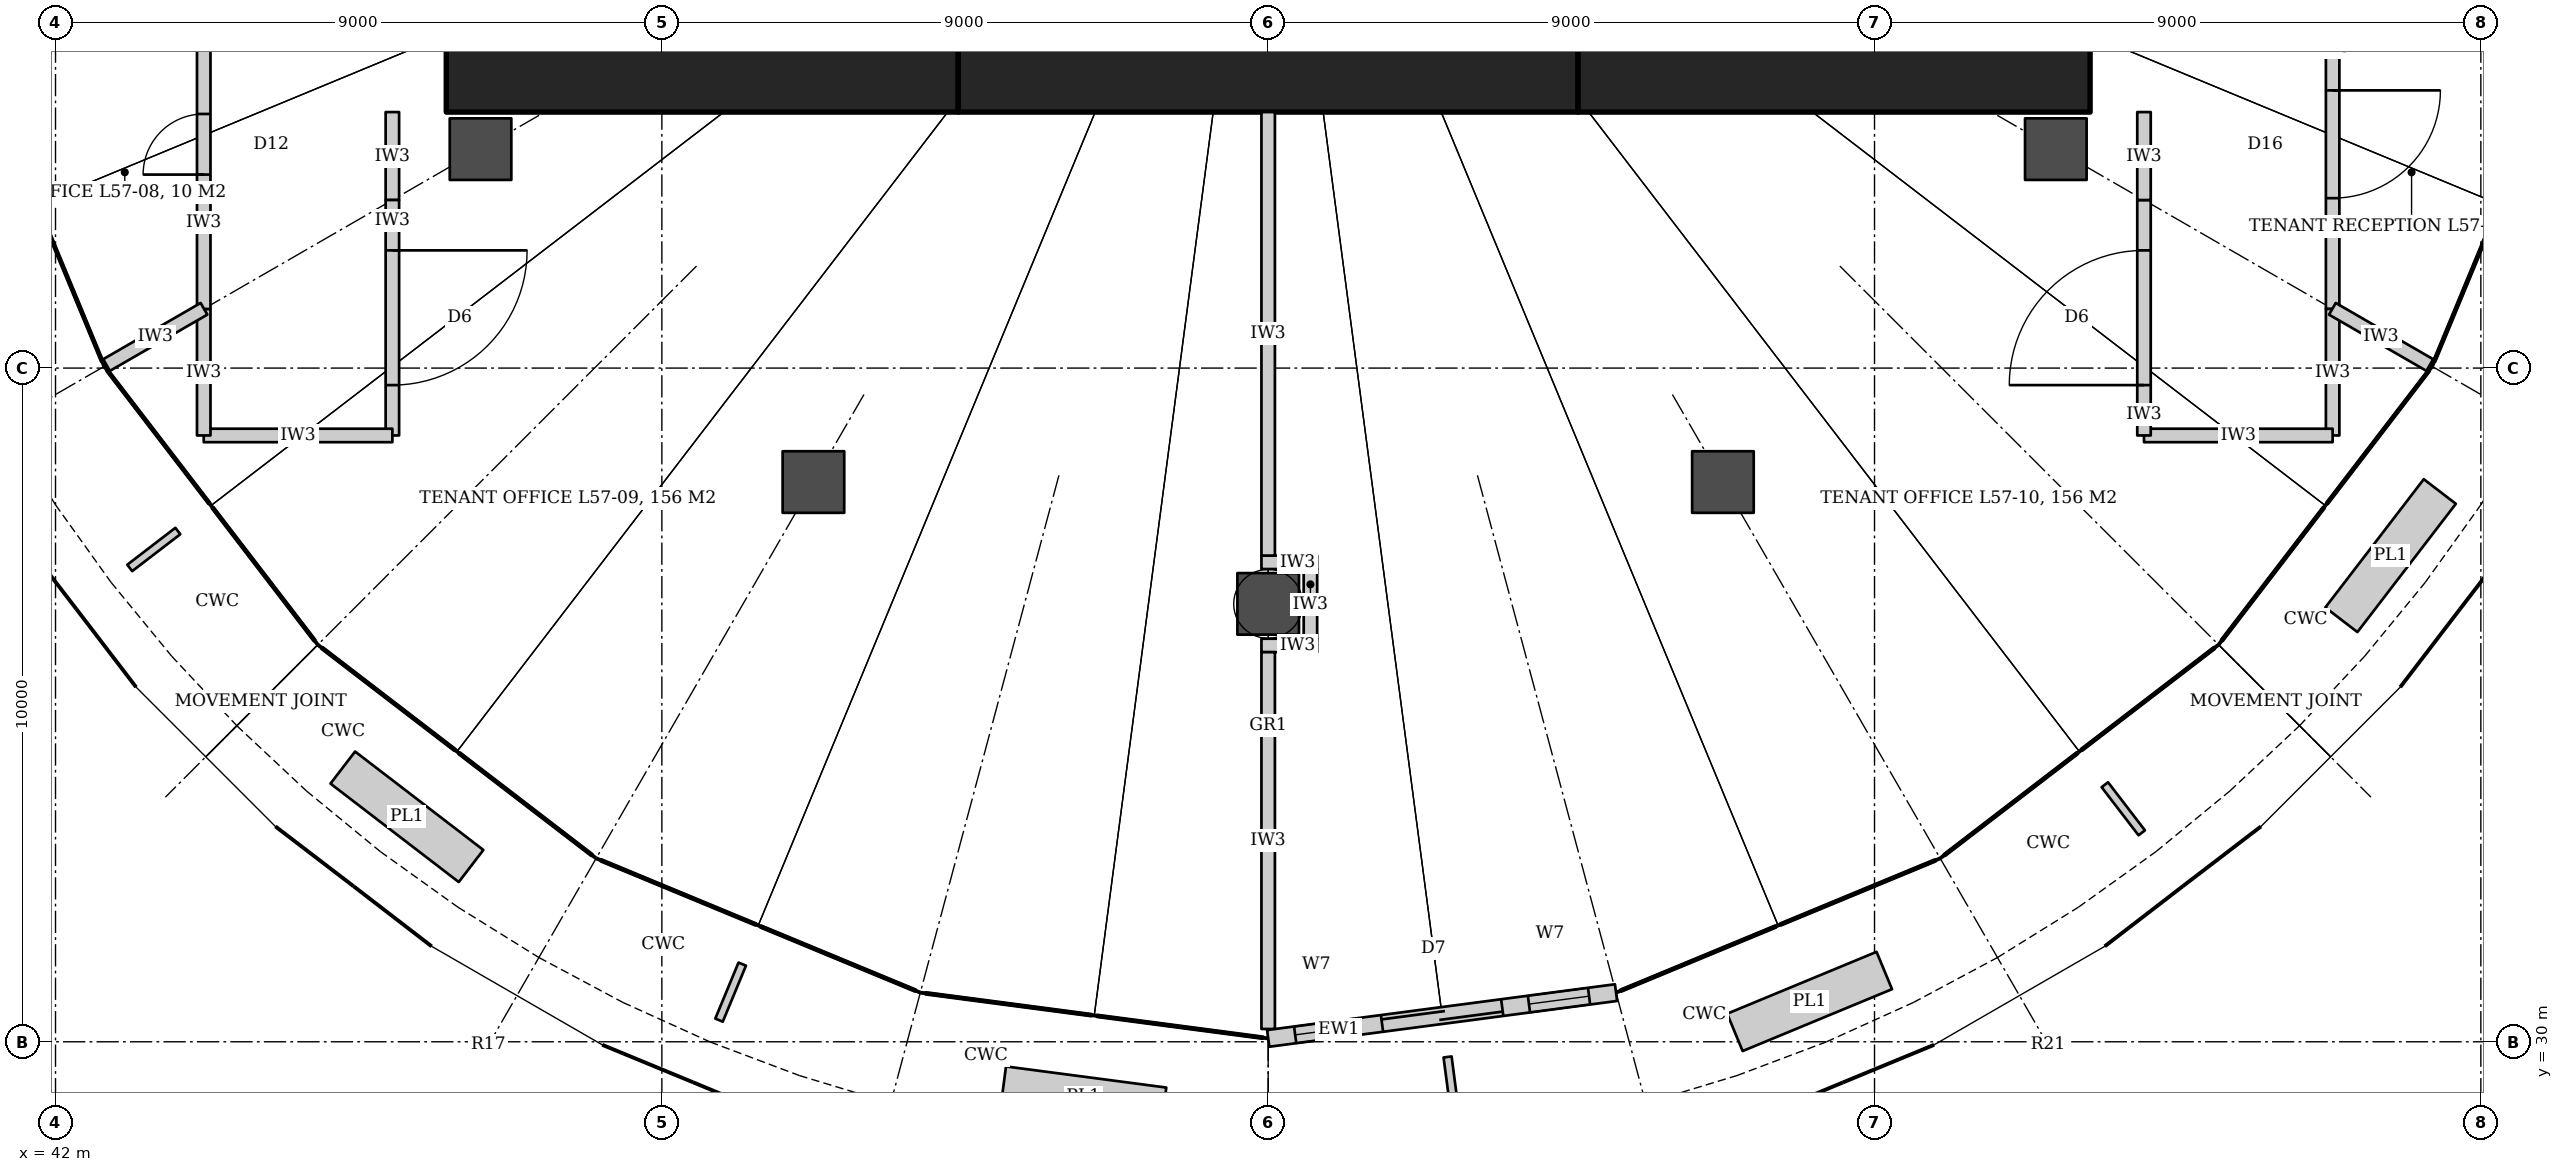
"""IFC4 building model, lengths in metres.
Left out: names, types, materials, properties, quantities, classifications, styles, units other than length and angle.
Written with IfcOpenShell. Run it as: python <this file> out.ifc"""

import sys

from ifc_helpers import new_model, si_unit, direction, frame, frame_2d, origin, origin_2d, place, context, subcontext, project, spatial, rectangle, hollow_circle, extrude, element, fill, save


model = new_model("IFC4")
c1 = context("Model", 3, precision=1e-05, world=origin(), true_north=direction((0.0, 1.0)))
c2 = subcontext(c1, "Body", "Model", "MODEL_VIEW")
j1 = project(units=[si_unit("LENGTHUNIT", "METRE"), si_unit("PLANEANGLEUNIT", "RADIAN")], contexts=[c1])
p1 = place(None, origin())
s1 = spatial("IfcSite", under=j1, at=p1, CompositionType="ELEMENT")
p2 = place(p1, origin())
s2 = spatial("IfcBuilding", under=s1, at=p2, CompositionType="ELEMENT")
p3 = place(p2, frame((0.0, 0.0, 240.2)))
s3 = spatial("IfcBuildingStorey", under=s2, at=p3, CompositionType="ELEMENT", Elevation=240.2)
p4 = place(p3, frame((47.8, 44.55, 0.0), z_axis=(0.0, 0.0, 1.0), x_axis=(1.0, 0.0, 0.0)))
e1 = element("IfcWall", 1, at=p4, inside=s3, PredefinedType="SHEAR", context=c2, shape_type="SweptSolid", body=[
    extrude(rectangle(XDim=7.6, YDim=1.5, at=frame_2d((3.8, 0.0))), origin(), (0.0, 0.0, 1.0), 4.2),
])
p5 = place(p3, frame((55.4, 44.55, 0.0), z_axis=(0.0, 0.0, 1.0), x_axis=(1.0, 0.0, 0.0)))
e2 = element("IfcWall", 2, at=p5, inside=s3, PredefinedType="SHEAR", context=c2, shape_type="SweptSolid", body=[
    extrude(rectangle(XDim=9.2, YDim=1.5, at=frame_2d((4.6, 0.0))), origin(), (0.0, 0.0, 1.0), 4.2),
])
p6 = place(p3, frame((64.6, 44.55, 0.0), z_axis=(0.0, 0.0, 1.0), x_axis=(1.0, 0.0, 0.0)))
e3 = element("IfcWall", 3, at=p6, inside=s3, PredefinedType="SHEAR", context=c2, shape_type="SweptSolid", body=[
    extrude(rectangle(XDim=7.6, YDim=1.5, at=frame_2d((3.8, 0.0))), origin(), (0.0, 0.0, 1.0), 4.2),
])
for number, where, z_axis, x_axis in (
    (4, (48.309, 43.25, 0.0), (0.0, 0.0, 1.0), (1.0, 0.0, 0.0)),
    (5, (53.25, 38.309, 0.0), (0.0, 0.0, 1.0), (1.0, 0.0, 0.0)),
    (6, (60.0, 36.5, 0.0), (0.0, 0.0, 1.0), (1.0, 0.0, 0.0)),
    (7, (66.75, 38.309, 0.0), (0.0, 0.0, 1.0), (1.0, 0.0, 0.0)),
    (8, (71.691, 43.25, 0.0), (0.0, 0.0, 1.0), (1.0, 0.0, 0.0)),
):
    element("IfcColumn", number, at=place(p3, frame(where, z_axis=z_axis, x_axis=x_axis)), inside=s3, PredefinedType="COLUMN", context=c2, shape_type="SweptSolid", body=[
        extrude(hollow_circle(Radius=0.457, WallThickness=0.045, at=origin_2d()), origin(), (0.0, 0.0, 1.0), 4.2),
    ])
p7 = place(p3, frame((75.8, 45.766, 0.0), z_axis=(0.0, 0.0, 1.0), x_axis=(0.0, -1.0, 0.0)))
e9 = element("IfcWall", 9, at=p7, inside=s3, PredefinedType="PARTITIONING", context=c2, shape_type="SweptSolid", body=[
    extrude(rectangle(XDim=4.888, YDim=0.2, at=frame_2d((2.444, 0.0))), origin(), (0.0, 0.0, 1.0), 3.02),
])
p8 = place(p7, frame((1.644, 0.0, 0.0)))
e10 = element("IfcOpeningElement", 10, at=p8, cuts=e9, PredefinedType="OPENING", context=c2, shape_type="SweptSolid", body=[
    extrude(rectangle(XDim=1.6, YDim=2.4, at=frame_2d((0.8, 1.2))), frame((0.0, 0.11, 0.0), z_axis=(0.0, -1.0, 0.0), x_axis=(1.0, 0.0, 0.0)), (0.0, 0.0, 1.0), 0.22),
])
p9 = place(p3, frame((75.8, 40.878, 0.0), z_axis=(0.0, 0.0, 1.0), x_axis=(0.0, -1.0, 0.0)))
e11 = element("IfcWall", 11, at=p9, inside=s3, PredefinedType="PARTITIONING", context=c2, shape_type="SweptSolid", body=[
    extrude(rectangle(XDim=1.878, YDim=0.2, at=frame_2d((0.939, 0.0))), origin(), (0.0, 0.0, 1.0), 3.02),
])
p10 = place(p3, frame((75.8, 39.0, 0.0), z_axis=(0.0, 0.0, 1.0), x_axis=(-1.0, 0.0, 0.0)))
e12 = element("IfcWall", 12, at=p10, inside=s3, PredefinedType="PARTITIONING", context=c2, shape_type="SweptSolid", body=[
    extrude(rectangle(XDim=2.8, YDim=0.2, at=frame_2d((1.4, 0.0))), origin(), (0.0, 0.0, 1.0), 3.04),
])
p11 = place(p3, frame((73.0, 39.0, 0.0), z_axis=(0.0, 0.0, 1.0), x_axis=(0.0, 1.0, 0.0)))
e13 = element("IfcWall", 13, at=p11, inside=s3, PredefinedType="PARTITIONING", context=c2, shape_type="SweptSolid", body=[
    extrude(rectangle(XDim=3.494, YDim=0.2, at=frame_2d((1.747, 0.0))), origin(), (0.0, 0.0, 1.0), 3.02),
])
p12 = place(p11, frame((0.747, 0.0, 0.0)))
e14 = element("IfcOpeningElement", 14, at=p12, cuts=e13, PredefinedType="OPENING", context=c2, shape_type="SweptSolid", body=[
    extrude(rectangle(XDim=2.0, YDim=2.1, at=frame_2d((1.0, 1.05))), frame((0.0, 0.11, 0.0), z_axis=(0.0, -1.0, 0.0), x_axis=(1.0, 0.0, 0.0)), (0.0, 0.0, 1.0), 0.22),
])
for number, where, z_axis, x_axis in (
    (15, (73.0, 42.494, 0.0), (0.0, 0.0, 1.0), (0.0, 1.0, 0.0)),
    (16, (47.0, 43.8, 0.0), (0.0, 0.0, 1.0), (0.0, -1.0, 0.0)),
):
    element("IfcWall", number, at=place(p3, frame(where, z_axis=z_axis, x_axis=x_axis)), inside=s3, PredefinedType="PARTITIONING", context=c2, shape_type="SweptSolid", body=[
        extrude(rectangle(XDim=1.306, YDim=0.2, at=frame_2d((0.653, 0.0))), origin(), (0.0, 0.0, 1.0), 3.02),
    ])
p13 = place(p3, frame((47.0, 42.494, 0.0), z_axis=(0.0, 0.0, 1.0), x_axis=(0.0, -1.0, 0.0)))
e17 = element("IfcWall", 17, at=p13, inside=s3, PredefinedType="PARTITIONING", context=c2, shape_type="SweptSolid", body=[
    extrude(rectangle(XDim=3.494, YDim=0.2, at=frame_2d((1.747, 0.0))), origin(), (0.0, 0.0, 1.0), 3.02),
])
p14 = place(p13, frame((0.747, 0.0, 0.0)))
e18 = element("IfcOpeningElement", 18, at=p14, cuts=e17, PredefinedType="OPENING", context=c2, shape_type="SweptSolid", body=[
    extrude(rectangle(XDim=2.0, YDim=2.1, at=frame_2d((1.0, 1.05))), frame((0.0, 0.11, 0.0), z_axis=(0.0, -1.0, 0.0), x_axis=(1.0, 0.0, 0.0)), (0.0, 0.0, 1.0), 0.22),
])
p15 = place(p3, frame((47.0, 39.0, 0.0), z_axis=(0.0, 0.0, 1.0), x_axis=(-1.0, 0.0, 0.0)))
e19 = element("IfcWall", 19, at=p15, inside=s3, PredefinedType="PARTITIONING", context=c2, shape_type="SweptSolid", body=[
    extrude(rectangle(XDim=2.8, YDim=0.2, at=frame_2d((1.4, 0.0))), origin(), (0.0, 0.0, 1.0), 3.04),
])
p16 = place(p3, frame((44.2, 39.0, 0.0), z_axis=(0.0, 0.0, 1.0), x_axis=(0.0, 1.0, 0.0)))
e20 = element("IfcWall", 20, at=p16, inside=s3, PredefinedType="PARTITIONING", context=c2, shape_type="SweptSolid", body=[
    extrude(rectangle(XDim=1.878, YDim=0.2, at=frame_2d((0.939, 0.0))), origin(), (0.0, 0.0, 1.0), 3.02),
])
p17 = place(p3, frame((44.2, 40.878, 0.0), z_axis=(0.0, 0.0, 1.0), x_axis=(0.0, 1.0, 0.0)))
e21 = element("IfcWall", 21, at=p17, inside=s3, PredefinedType="PARTITIONING", context=c2, shape_type="SweptSolid", body=[
    extrude(rectangle(XDim=4.888, YDim=0.2, at=frame_2d((2.444, 0.0))), origin(), (0.0, 0.0, 1.0), 3.02),
])
p18 = place(p17, frame((1.994, 0.0, 0.0)))
e22 = element("IfcOpeningElement", 22, at=p18, cuts=e21, PredefinedType="OPENING", context=c2, shape_type="SweptSolid", body=[
    extrude(rectangle(XDim=0.9, YDim=2.4, at=frame_2d((0.45, 1.2))), frame((0.0, 0.11, 0.0), z_axis=(0.0, -1.0, 0.0), x_axis=(1.0, 0.0, 0.0)), (0.0, 0.0, 1.0), 0.22),
])
p19 = place(p3, frame((44.204, 40.88, 0.0), z_axis=(0.0, 0.0, 1.0), x_axis=(-0.866073756611, -0.499916241094, 0.0)))
e23 = element("IfcWall", 23, at=p19, inside=s3, PredefinedType="PARTITIONING", context=c2, shape_type="SweptSolid", body=[
    extrude(rectangle(XDim=1.745, YDim=0.2, at=frame_2d((0.873, 0.0))), origin(), (0.0, 0.0, 1.0), 3.02),
])
for number, where, z_axis, x_axis in (
    (24, (59.9, 37.117, 0.0), (0.0, 0.0, 1.0), (1.0, 0.0, 0.0)),
    (25, (59.9, 35.883, 0.0), (0.0, 0.0, 1.0), (1.0, 0.0, 0.0)),
):
    element("IfcWall", number, at=place(p3, frame(where, z_axis=z_axis, x_axis=x_axis)), inside=s3, PredefinedType="PARTITIONING", context=c2, shape_type="SweptSolid", body=[
        extrude(rectangle(XDim=0.827, YDim=0.2, at=frame_2d((0.414, 0.0))), origin(), (0.0, 0.0, 1.0), 3.02),
    ])
p20 = place(p3, frame((60.627, 37.017, 0.0), z_axis=(0.0, 0.0, 1.0), x_axis=(0.0, -1.0, 0.0)))
e26 = element("IfcWall", 26, at=p20, inside=s3, PredefinedType="PARTITIONING", context=c2, shape_type="SweptSolid", body=[
    extrude(rectangle(XDim=1.034, YDim=0.2, at=frame_2d((0.517, 0.0))), origin(), (0.0, 0.0, 1.0), 3.02),
])
p21 = place(p3, frame((60.0, 43.8, 0.0), z_axis=(0.0, 0.0, 1.0), x_axis=(0.0, -1.0, 0.0)))
e27 = element("IfcWall", 27, at=p21, inside=s3, PredefinedType="PARTITIONING", context=c2, shape_type="SweptSolid", body=[
    extrude(rectangle(XDim=6.583, YDim=0.2, at=frame_2d((3.292, 0.0))), origin(), (0.0, 0.0, 1.0), 3.04),
])
p22 = place(p3, frame((60.0, 35.783, 0.0), z_axis=(0.0, 0.0, 1.0), x_axis=(0.0, -1.0, 0.0)))
e28 = element("IfcWall", 28, at=p22, inside=s3, PredefinedType="PARTITIONING", context=c2, shape_type="SweptSolid", body=[
    extrude(rectangle(XDim=5.668, YDim=0.2, at=frame_2d((2.834, 0.0))), origin(), (0.0, 0.0, 1.0), 3.02),
])
p23 = place(p3, frame((75.796, 40.88, 0.0), z_axis=(0.0, 0.0, 1.0), x_axis=(0.866073756611, -0.499916241094, 0.0)))
e29 = element("IfcWall", 29, at=p23, inside=s3, PredefinedType="PARTITIONING", context=c2, shape_type="SweptSolid", body=[
    extrude(rectangle(XDim=1.745, YDim=0.2, at=frame_2d((0.873, 0.0))), origin(), (0.0, 0.0, 1.0), 3.02),
])
p24 = place(p3, frame((60.0, 29.975, 0.0), z_axis=(0.0, 0.0, 1.0), x_axis=(0.99145000307, 0.130487131216, 0.0)))
e30 = element("IfcWall", 30, at=p24, inside=s3, PredefinedType="SOLIDWALL", context=c2, shape_type="SweptSolid", body=[
    extrude(rectangle(XDim=5.228, YDim=0.25, at=frame_2d((2.614, 0.0))), origin(), (0.0, 0.0, 1.0), 4.04),
])
p25 = place(p24, frame((1.714, 0.0, 0.0)))
e31 = element("IfcOpeningElement", 31, at=p25, cuts=e30, PredefinedType="OPENING", context=c2, shape_type="SweptSolid", body=[
    extrude(rectangle(XDim=1.8, YDim=2.4, at=frame_2d((0.9, 1.2))), frame((0.0, 0.135, 0.0), z_axis=(0.0, -1.0, 0.0), x_axis=(1.0, 0.0, 0.0)), (0.0, 0.0, 1.0), 0.27),
])
p26 = place(p24, frame((0.414, 0.0, 0.0)))
e32 = element("IfcOpeningElement", 32, at=p26, cuts=e30, PredefinedType="OPENING", context=c2, shape_type="SweptSolid", body=[
    extrude(rectangle(XDim=0.9, YDim=2.4, at=frame_2d((0.45, 1.2))), frame((0.0, 0.135, 0.0), z_axis=(0.0, -1.0, 0.0), x_axis=(1.0, 0.0, 0.0)), (0.0, 0.0, 1.0), 0.27),
])
p27 = place(p24, frame((3.914, 0.0, 0.0)))
e33 = element("IfcOpeningElement", 33, at=p27, cuts=e30, PredefinedType="OPENING", context=c2, shape_type="SweptSolid", body=[
    extrude(rectangle(XDim=0.9, YDim=2.4, at=frame_2d((0.45, 1.2))), frame((0.0, 0.135, 0.0), z_axis=(0.0, -1.0, 0.0), x_axis=(1.0, 0.0, 0.0)), (0.0, 0.0, 1.0), 0.27),
])
p28 = place(p18, origin())
e34 = element("IfcDoor", 34, at=p28, inside=s3, OperationType="SINGLE_SWING_LEFT", PredefinedType="DOOR", context=c2, shape_type="SweptSolid", body=[
    extrude(rectangle(XDim=0.9, YDim=2.4, at=frame_2d((0.45, 1.2))), frame((0.0, 0.025, 0.0), z_axis=(0.0, -1.0, 0.0), x_axis=(1.0, 0.0, 0.0)), (0.0, 0.0, 1.0), 0.05),
])
fill(e22, e34)
p29 = place(p14, origin())
e35 = element("IfcDoor", 35, at=p29, inside=s3, OperationType="DOUBLE_DOOR_DOUBLE_SWING", PredefinedType="DOOR", context=c2, shape_type="SweptSolid", body=[
    extrude(rectangle(XDim=2.0, YDim=2.1, at=frame_2d((1.0, 1.05))), frame((0.0, 0.025, 0.0), z_axis=(0.0, -1.0, 0.0), x_axis=(1.0, 0.0, 0.0)), (0.0, 0.0, 1.0), 0.05),
])
fill(e18, e35)
p30 = place(p12, origin())
e36 = element("IfcDoor", 36, at=p30, inside=s3, OperationType="DOUBLE_DOOR_DOUBLE_SWING", PredefinedType="DOOR", context=c2, shape_type="SweptSolid", body=[
    extrude(rectangle(XDim=2.0, YDim=2.1, at=frame_2d((1.0, 1.05))), frame((0.0, 0.025, 0.0), z_axis=(0.0, -1.0, 0.0), x_axis=(1.0, 0.0, 0.0)), (0.0, 0.0, 1.0), 0.05),
])
fill(e14, e36)
p31 = place(p8, origin())
e37 = element("IfcDoor", 37, at=p31, inside=s3, OperationType="DOUBLE_DOOR_DOUBLE_SWING", PredefinedType="DOOR", context=c2, shape_type="SweptSolid", body=[
    extrude(rectangle(XDim=1.6, YDim=2.4, at=frame_2d((0.8, 1.2))), frame((0.0, 0.025, 0.0), z_axis=(0.0, -1.0, 0.0), x_axis=(1.0, 0.0, 0.0)), (0.0, 0.0, 1.0), 0.05),
])
fill(e10, e37)
p32 = place(p25, origin())
e38 = element("IfcDoor", 38, at=p32, inside=s3, OperationType="DOUBLE_DOOR_SLIDING", PredefinedType="DOOR", context=c2, shape_type="SweptSolid", body=[
    extrude(rectangle(XDim=1.8, YDim=2.4, at=frame_2d((0.9, 1.2))), frame((0.0, 0.025, 0.0), z_axis=(0.0, -1.0, 0.0), x_axis=(1.0, 0.0, 0.0)), (0.0, 0.0, 1.0), 0.05),
])
fill(e31, e38)
p33 = place(p26, origin())
e39 = element("IfcWindow", 39, at=p33, inside=s3, PartitioningType="SINGLE_PANEL", PredefinedType="WINDOW", context=c2, shape_type="SweptSolid", body=[
    extrude(rectangle(XDim=0.9, YDim=2.4, at=frame_2d((0.45, 1.2))), frame((0.0, 0.03, 0.0), z_axis=(0.0, -1.0, 0.0), x_axis=(1.0, 0.0, 0.0)), (0.0, 0.0, 1.0), 0.06),
])
fill(e32, e39)
p34 = place(p27, origin())
e40 = element("IfcWindow", 40, at=p34, inside=s3, PartitioningType="SINGLE_PANEL", PredefinedType="WINDOW", context=c2, shape_type="SweptSolid", body=[
    extrude(rectangle(XDim=0.9, YDim=2.4, at=frame_2d((0.45, 1.2))), frame((0.0, 0.03, 0.0), z_axis=(0.0, -1.0, 0.0), x_axis=(1.0, 0.0, 0.0)), (0.0, 0.0, 1.0), 0.06),
])
fill(e33, e40)
save(model, sys.argv[1])
